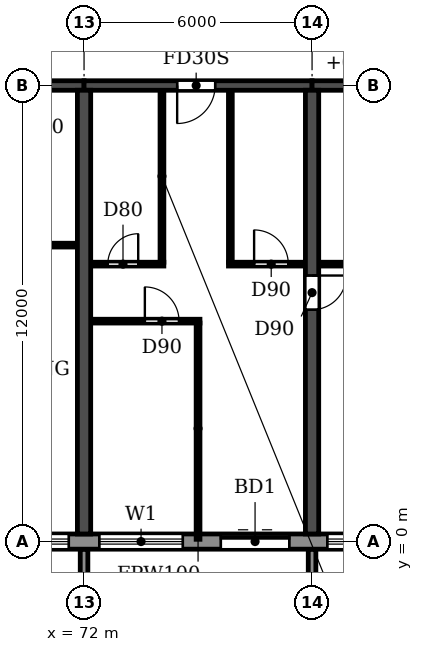
"""IFC4 building model, lengths in metres.
Left out: names, types, materials, properties, quantities, classifications, styles, units other than length and angle.
Written with IfcOpenShell. Run it as: python <this file> out.ifc"""

import sys

from ifc_helpers import new_model, si_unit, direction, frame, frame_2d, origin, place, context, subcontext, project, spatial, polyline, rectangle, outline, extrude, source, transform, mapped, element, fill, save


model = new_model("IFC4")
c1 = context("Model", 3, precision=1e-05, world=origin(), true_north=direction((0.0, 1.0)))
c2 = subcontext(c1, "Body", "Model", "MODEL_VIEW")
j1 = project(units=[si_unit("LENGTHUNIT", "METRE"), si_unit("PLANEANGLEUNIT", "RADIAN")], contexts=[c1])
p1 = place(None, origin())
s1 = spatial("IfcSite", under=j1, at=p1, CompositionType="ELEMENT")
p2 = place(p1, origin())
s2 = spatial("IfcBuilding", under=s1, at=p2, CompositionType="ELEMENT")
p3 = place(p2, frame((0.0, 0.0, 76.2)))
s3 = spatial("IfcBuildingStorey", under=s2, at=p3, CompositionType="ELEMENT", Elevation=76.2)
p4 = place(p3, frame((72.0, 0.2, 0.0), z_axis=(0.0, 0.0, 1.0), x_axis=(0.0, 1.0, 0.0)))
e1 = element("IfcWall", 1, at=p4, inside=s3, PredefinedType="SHEAR", context=c2, shape_type="SweptSolid", body=[
    extrude(rectangle(XDim=11.675, YDim=0.35, at=frame_2d((5.837, 0.0))), origin(), (0.0, 0.0, 1.0), 3.06),
])
p5 = place(p3, frame((78.0, 0.2, 0.0), z_axis=(0.0, 0.0, 1.0), x_axis=(0.0, 1.0, 0.0)))
e2 = element("IfcWall", 2, at=p5, inside=s3, PredefinedType="SHEAR", context=c2, shape_type="SweptSolid", body=[
    extrude(rectangle(XDim=11.675, YDim=0.35, at=frame_2d((5.837, 0.0))), origin(), (0.0, 0.0, 1.0), 3.06),
])
p6 = place(p5, frame((5.9, 0.0, 0.0)))
e3 = element("IfcOpeningElement", 3, at=p6, cuts=e2, PredefinedType="OPENING", context=c2, shape_type="SweptSolid", body=[
    extrude(rectangle(XDim=0.9, YDim=2.1, at=frame_2d((0.45, 1.05))), frame((0.0, 0.185, 0.0), z_axis=(0.0, -1.0, 0.0), x_axis=(1.0, 0.0, 0.0)), (0.0, 0.0, 1.0), 0.37),
])
p7 = place(p3, frame((66.0, 12.0, 0.0), z_axis=(0.0, 0.0, 1.0), x_axis=(1.0, 0.0, 0.0)))
e4 = element("IfcWall", 4, at=p7, inside=s3, PredefinedType="SHEAR", context=c2, shape_type="SweptSolid", body=[
    extrude(rectangle(XDim=6.0, YDim=0.25, at=frame_2d((3.0, 0.0))), origin(), (0.0, 0.0, 1.0), 2.46),
])
p8 = place(p7, frame((2.55, 0.0, 0.0)))
e5 = element("IfcOpeningElement", 5, at=p8, cuts=e4, PredefinedType="OPENING", context=c2, shape_type="SweptSolid", body=[
    extrude(rectangle(XDim=1.0, YDim=2.1, at=frame_2d((0.5, 1.05))), frame((0.0, 0.135, 0.0), z_axis=(0.0, -1.0, 0.0), x_axis=(1.0, 0.0, 0.0)), (0.0, 0.0, 1.0), 0.27),
])
p9 = place(p3, frame((72.0, 12.0, 0.0), z_axis=(0.0, 0.0, 1.0), x_axis=(1.0, 0.0, 0.0)))
e6 = element("IfcWall", 6, at=p9, inside=s3, PredefinedType="SHEAR", context=c2, shape_type="SweptSolid", body=[
    extrude(rectangle(XDim=6.0, YDim=0.25, at=frame_2d((3.0, 0.0))), origin(), (0.0, 0.0, 1.0), 2.46),
])
p10 = place(p9, frame((2.45, 0.0, 0.0)))
e7 = element("IfcOpeningElement", 7, at=p10, cuts=e6, PredefinedType="OPENING", context=c2, shape_type="SweptSolid", body=[
    extrude(rectangle(XDim=1.0, YDim=2.1, at=frame_2d((0.5, 1.05))), frame((0.0, 0.135, 0.0), z_axis=(0.0, -1.0, 0.0), x_axis=(1.0, 0.0, 0.0)), (0.0, 0.0, 1.0), 0.27),
])
p11 = place(p3, frame((78.0, 12.0, 0.0), z_axis=(0.0, 0.0, 1.0), x_axis=(1.0, 0.0, 0.0)))
e8 = element("IfcWall", 8, at=p11, inside=s3, PredefinedType="SHEAR", context=c2, shape_type="SweptSolid", body=[
    extrude(rectangle(XDim=6.0, YDim=0.25, at=frame_2d((3.0, 0.0))), origin(), (0.0, 0.0, 1.0), 2.46),
])
p12 = place(p3, frame((10.683, 0.0, 0.0), z_axis=(0.0, 0.0, 1.0), x_axis=(1.0, 0.0, 0.0)))
e9 = element("IfcWall", 9, at=p12, inside=s3, PredefinedType="STANDARD", context=c2, shape_type="SweptSolid", body=[
    extrude(rectangle(XDim=80.634, YDim=0.4, at=frame_2d((40.317, 0.0))), origin(), (0.0, 0.0, 1.0), 3.06),
])
p13 = place(p12, frame((1.717, 0.0, 0.9)))
e10 = element("IfcOpeningElement", 10, at=p13, cuts=e9, PredefinedType="OPENING", context=c2, shape_type="SweptSolid", body=[
    extrude(rectangle(XDim=2.2, YDim=1.5, at=frame_2d((1.1, 0.75))), frame((0.0, 0.21, 0.0), z_axis=(0.0, -1.0, 0.0), x_axis=(1.0, 0.0, 0.0)), (0.0, 0.0, 1.0), 0.42),
])
p14 = place(p12, frame((4.917, 0.0, 0.0)))
e11 = element("IfcOpeningElement", 11, at=p14, cuts=e9, PredefinedType="OPENING", context=c2, shape_type="SweptSolid", body=[
    extrude(rectangle(XDim=1.8, YDim=2.4, at=frame_2d((0.9, 1.2))), frame((0.0, 0.21, 0.0), z_axis=(0.0, -1.0, 0.0), x_axis=(1.0, 0.0, 0.0)), (0.0, 0.0, 1.0), 0.42),
])
p15 = place(p12, frame((7.717, 0.0, 0.9)))
e12 = element("IfcOpeningElement", 12, at=p15, cuts=e9, PredefinedType="OPENING", context=c2, shape_type="SweptSolid", body=[
    extrude(rectangle(XDim=2.2, YDim=1.5, at=frame_2d((1.1, 0.75))), frame((0.0, 0.21, 0.0), z_axis=(0.0, -1.0, 0.0), x_axis=(1.0, 0.0, 0.0)), (0.0, 0.0, 1.0), 0.42),
])
p16 = place(p12, frame((10.717, 0.0, 0.9)))
e13 = element("IfcOpeningElement", 13, at=p16, cuts=e9, PredefinedType="OPENING", context=c2, shape_type="SweptSolid", body=[
    extrude(rectangle(XDim=2.2, YDim=1.5, at=frame_2d((1.1, 0.75))), frame((0.0, 0.21, 0.0), z_axis=(0.0, -1.0, 0.0), x_axis=(1.0, 0.0, 0.0)), (0.0, 0.0, 1.0), 0.42),
])
p17 = place(p12, frame((13.717, 0.0, 0.9)))
e14 = element("IfcOpeningElement", 14, at=p17, cuts=e9, PredefinedType="OPENING", context=c2, shape_type="SweptSolid", body=[
    extrude(rectangle(XDim=2.2, YDim=1.5, at=frame_2d((1.1, 0.75))), frame((0.0, 0.21, 0.0), z_axis=(0.0, -1.0, 0.0), x_axis=(1.0, 0.0, 0.0)), (0.0, 0.0, 1.0), 0.42),
])
p18 = place(p12, frame((16.917, 0.0, 0.0)))
e15 = element("IfcOpeningElement", 15, at=p18, cuts=e9, PredefinedType="OPENING", context=c2, shape_type="SweptSolid", body=[
    extrude(rectangle(XDim=1.8, YDim=2.4, at=frame_2d((0.9, 1.2))), frame((0.0, 0.21, 0.0), z_axis=(0.0, -1.0, 0.0), x_axis=(1.0, 0.0, 0.0)), (0.0, 0.0, 1.0), 0.42),
])
p19 = place(p12, frame((19.717, 0.0, 0.9)))
e16 = element("IfcOpeningElement", 16, at=p19, cuts=e9, PredefinedType="OPENING", context=c2, shape_type="SweptSolid", body=[
    extrude(rectangle(XDim=2.2, YDim=1.5, at=frame_2d((1.1, 0.75))), frame((0.0, 0.21, 0.0), z_axis=(0.0, -1.0, 0.0), x_axis=(1.0, 0.0, 0.0)), (0.0, 0.0, 1.0), 0.42),
])
p20 = place(p12, frame((22.717, 0.0, 0.9)))
e17 = element("IfcOpeningElement", 17, at=p20, cuts=e9, PredefinedType="OPENING", context=c2, shape_type="SweptSolid", body=[
    extrude(rectangle(XDim=2.2, YDim=1.5, at=frame_2d((1.1, 0.75))), frame((0.0, 0.21, 0.0), z_axis=(0.0, -1.0, 0.0), x_axis=(1.0, 0.0, 0.0)), (0.0, 0.0, 1.0), 0.42),
])
p21 = place(p12, frame((25.917, 0.0, 0.0)))
e18 = element("IfcOpeningElement", 18, at=p21, cuts=e9, PredefinedType="OPENING", context=c2, shape_type="SweptSolid", body=[
    extrude(rectangle(XDim=1.8, YDim=2.4, at=frame_2d((0.9, 1.2))), frame((0.0, 0.21, 0.0), z_axis=(0.0, -1.0, 0.0), x_axis=(1.0, 0.0, 0.0)), (0.0, 0.0, 1.0), 0.42),
])
p22 = place(p12, frame((28.717, 0.0, 0.9)))
e19 = element("IfcOpeningElement", 19, at=p22, cuts=e9, PredefinedType="OPENING", context=c2, shape_type="SweptSolid", body=[
    extrude(rectangle(XDim=2.2, YDim=1.5, at=frame_2d((1.1, 0.75))), frame((0.0, 0.21, 0.0), z_axis=(0.0, -1.0, 0.0), x_axis=(1.0, 0.0, 0.0)), (0.0, 0.0, 1.0), 0.42),
])
p23 = place(p12, frame((31.717, 0.0, 0.9)))
e20 = element("IfcOpeningElement", 20, at=p23, cuts=e9, PredefinedType="OPENING", context=c2, shape_type="SweptSolid", body=[
    extrude(rectangle(XDim=2.2, YDim=1.5, at=frame_2d((1.1, 0.75))), frame((0.0, 0.21, 0.0), z_axis=(0.0, -1.0, 0.0), x_axis=(1.0, 0.0, 0.0)), (0.0, 0.0, 1.0), 0.42),
])
p24 = place(p12, frame((34.717, 0.0, 0.9)))
e21 = element("IfcOpeningElement", 21, at=p24, cuts=e9, PredefinedType="OPENING", context=c2, shape_type="SweptSolid", body=[
    extrude(rectangle(XDim=2.2, YDim=1.5, at=frame_2d((1.1, 0.75))), frame((0.0, 0.21, 0.0), z_axis=(0.0, -1.0, 0.0), x_axis=(1.0, 0.0, 0.0)), (0.0, 0.0, 1.0), 0.42),
])
p25 = place(p12, frame((37.917, 0.0, 0.0)))
e22 = element("IfcOpeningElement", 22, at=p25, cuts=e9, PredefinedType="OPENING", context=c2, shape_type="SweptSolid", body=[
    extrude(rectangle(XDim=1.8, YDim=2.4, at=frame_2d((0.9, 1.2))), frame((0.0, 0.21, 0.0), z_axis=(0.0, -1.0, 0.0), x_axis=(1.0, 0.0, 0.0)), (0.0, 0.0, 1.0), 0.42),
])
p26 = place(p12, frame((40.717, 0.0, 0.9)))
e23 = element("IfcOpeningElement", 23, at=p26, cuts=e9, PredefinedType="OPENING", context=c2, shape_type="SweptSolid", body=[
    extrude(rectangle(XDim=2.2, YDim=1.5, at=frame_2d((1.1, 0.75))), frame((0.0, 0.21, 0.0), z_axis=(0.0, -1.0, 0.0), x_axis=(1.0, 0.0, 0.0)), (0.0, 0.0, 1.0), 0.42),
])
p27 = place(p12, frame((43.717, 0.0, 0.9)))
e24 = element("IfcOpeningElement", 24, at=p27, cuts=e9, PredefinedType="OPENING", context=c2, shape_type="SweptSolid", body=[
    extrude(rectangle(XDim=2.2, YDim=1.5, at=frame_2d((1.1, 0.75))), frame((0.0, 0.21, 0.0), z_axis=(0.0, -1.0, 0.0), x_axis=(1.0, 0.0, 0.0)), (0.0, 0.0, 1.0), 0.42),
])
p28 = place(p12, frame((46.717, 0.0, 0.9)))
e25 = element("IfcOpeningElement", 25, at=p28, cuts=e9, PredefinedType="OPENING", context=c2, shape_type="SweptSolid", body=[
    extrude(rectangle(XDim=2.2, YDim=1.5, at=frame_2d((1.1, 0.75))), frame((0.0, 0.21, 0.0), z_axis=(0.0, -1.0, 0.0), x_axis=(1.0, 0.0, 0.0)), (0.0, 0.0, 1.0), 0.42),
])
p29 = place(p12, frame((49.917, 0.0, 0.0)))
e26 = element("IfcOpeningElement", 26, at=p29, cuts=e9, PredefinedType="OPENING", context=c2, shape_type="SweptSolid", body=[
    extrude(rectangle(XDim=1.8, YDim=2.4, at=frame_2d((0.9, 1.2))), frame((0.0, 0.21, 0.0), z_axis=(0.0, -1.0, 0.0), x_axis=(1.0, 0.0, 0.0)), (0.0, 0.0, 1.0), 0.42),
])
p30 = place(p12, frame((52.717, 0.0, 0.9)))
e27 = element("IfcOpeningElement", 27, at=p30, cuts=e9, PredefinedType="OPENING", context=c2, shape_type="SweptSolid", body=[
    extrude(rectangle(XDim=2.2, YDim=1.5, at=frame_2d((1.1, 0.75))), frame((0.0, 0.21, 0.0), z_axis=(0.0, -1.0, 0.0), x_axis=(1.0, 0.0, 0.0)), (0.0, 0.0, 1.0), 0.42),
])
p31 = place(p12, frame((55.717, 0.0, 0.9)))
e28 = element("IfcOpeningElement", 28, at=p31, cuts=e9, PredefinedType="OPENING", context=c2, shape_type="SweptSolid", body=[
    extrude(rectangle(XDim=2.2, YDim=1.5, at=frame_2d((1.1, 0.75))), frame((0.0, 0.21, 0.0), z_axis=(0.0, -1.0, 0.0), x_axis=(1.0, 0.0, 0.0)), (0.0, 0.0, 1.0), 0.42),
])
p32 = place(p12, frame((58.717, 0.0, 0.9)))
e29 = element("IfcOpeningElement", 29, at=p32, cuts=e9, PredefinedType="OPENING", context=c2, shape_type="SweptSolid", body=[
    extrude(rectangle(XDim=2.2, YDim=1.5, at=frame_2d((1.1, 0.75))), frame((0.0, 0.21, 0.0), z_axis=(0.0, -1.0, 0.0), x_axis=(1.0, 0.0, 0.0)), (0.0, 0.0, 1.0), 0.42),
])
p33 = place(p12, frame((61.717, 0.0, 0.9)))
e30 = element("IfcOpeningElement", 30, at=p33, cuts=e9, PredefinedType="OPENING", context=c2, shape_type="SweptSolid", body=[
    extrude(rectangle(XDim=2.2, YDim=1.5, at=frame_2d((1.1, 0.75))), frame((0.0, 0.21, 0.0), z_axis=(0.0, -1.0, 0.0), x_axis=(1.0, 0.0, 0.0)), (0.0, 0.0, 1.0), 0.42),
])
p34 = place(p12, frame((64.917, 0.0, 0.0)))
e31 = element("IfcOpeningElement", 31, at=p34, cuts=e9, PredefinedType="OPENING", context=c2, shape_type="SweptSolid", body=[
    extrude(rectangle(XDim=1.8, YDim=2.4, at=frame_2d((0.9, 1.2))), frame((0.0, 0.21, 0.0), z_axis=(0.0, -1.0, 0.0), x_axis=(1.0, 0.0, 0.0)), (0.0, 0.0, 1.0), 0.42),
])
p35 = place(p12, frame((67.717, 0.0, 0.9)))
e32 = element("IfcOpeningElement", 32, at=p35, cuts=e9, PredefinedType="OPENING", context=c2, shape_type="SweptSolid", body=[
    extrude(rectangle(XDim=2.2, YDim=1.5, at=frame_2d((1.1, 0.75))), frame((0.0, 0.21, 0.0), z_axis=(0.0, -1.0, 0.0), x_axis=(1.0, 0.0, 0.0)), (0.0, 0.0, 1.0), 0.42),
])
p36 = place(p12, frame((70.717, 0.0, 0.9)))
e33 = element("IfcOpeningElement", 33, at=p36, cuts=e9, PredefinedType="OPENING", context=c2, shape_type="SweptSolid", body=[
    extrude(rectangle(XDim=2.2, YDim=1.5, at=frame_2d((1.1, 0.75))), frame((0.0, 0.21, 0.0), z_axis=(0.0, -1.0, 0.0), x_axis=(1.0, 0.0, 0.0)), (0.0, 0.0, 1.0), 0.42),
])
p37 = place(p12, frame((73.917, 0.0, 0.0)))
e34 = element("IfcOpeningElement", 34, at=p37, cuts=e9, PredefinedType="OPENING", context=c2, shape_type="SweptSolid", body=[
    extrude(rectangle(XDim=1.8, YDim=2.4, at=frame_2d((0.9, 1.2))), frame((0.0, 0.21, 0.0), z_axis=(0.0, -1.0, 0.0), x_axis=(1.0, 0.0, 0.0)), (0.0, 0.0, 1.0), 0.42),
])
p38 = place(p12, frame((76.717, 0.0, 0.9)))
e35 = element("IfcOpeningElement", 35, at=p38, cuts=e9, PredefinedType="OPENING", context=c2, shape_type="SweptSolid", body=[
    extrude(rectangle(XDim=2.2, YDim=1.5, at=frame_2d((1.1, 0.75))), frame((0.0, 0.21, 0.0), z_axis=(0.0, -1.0, 0.0), x_axis=(1.0, 0.0, 0.0)), (0.0, 0.0, 1.0), 0.42),
])
m1 = source(origin(), c2, "Body", "SweptSolid", [
    extrude(outline(polyline([(0.0, 0.0), (0.2, 0.0), (0.2, 1.65), (0.0, 1.65), (0.0, 0.0)])), origin(), (0.0, 0.0, 1.0), 3.1),
])
for number, where in (
    (36, (71.9, -1.85, 0.0)),
    (37, (77.9, -1.85, 0.0)),
):
    element("IfcWall", number, at=place(p3, frame(where)), inside=s3, PredefinedType="STANDARD", context=c2, shape_type="MappedRepresentation", body=[
        mapped(m1, transform((0.0, 0.0, 0.0))),
    ])
p39 = place(p3, frame((72.185, 5.8, 0.0), z_axis=(0.0, 0.0, 1.0), x_axis=(1.0, 0.0, 0.0)))
e38 = element("IfcWall", 38, at=p39, inside=s3, PredefinedType="PARTITIONING", context=c2, shape_type="SweptSolid", body=[
    extrude(rectangle(XDim=2.865, YDim=0.1, at=frame_2d((1.433, 0.0))), origin(), (0.0, 0.0, 1.0), 3.06),
])
p40 = place(p39, frame((1.415, 0.0, 0.0)))
e39 = element("IfcOpeningElement", 39, at=p40, cuts=e38, PredefinedType="OPENING", context=c2, shape_type="SweptSolid", body=[
    extrude(rectangle(XDim=0.9, YDim=2.1, at=frame_2d((0.45, 1.05))), frame((0.0, 0.06, 0.0), z_axis=(0.0, -1.0, 0.0), x_axis=(1.0, 0.0, 0.0)), (0.0, 0.0, 1.0), 0.12),
])
p41 = place(p3, frame((72.185, 7.3, 0.0), z_axis=(0.0, 0.0, 1.0), x_axis=(1.0, 0.0, 0.0)))
e40 = element("IfcWall", 40, at=p41, inside=s3, PredefinedType="PARTITIONING", context=c2, shape_type="SweptSolid", body=[
    extrude(rectangle(XDim=1.915, YDim=0.1, at=frame_2d((0.958, 0.0))), origin(), (0.0, 0.0, 1.0), 3.06),
])
p42 = place(p41, frame((0.44, 0.0, 0.0)))
e41 = element("IfcOpeningElement", 41, at=p42, cuts=e40, PredefinedType="OPENING", context=c2, shape_type="SweptSolid", body=[
    extrude(rectangle(XDim=0.8, YDim=2.1, at=frame_2d((0.4, 1.05))), frame((0.0, 0.06, 0.0), z_axis=(0.0, -1.0, 0.0), x_axis=(1.0, 0.0, 0.0)), (0.0, 0.0, 1.0), 0.12),
])
p43 = place(p3, frame((75.8, 7.3, 0.0), z_axis=(0.0, 0.0, 1.0), x_axis=(1.0, 0.0, 0.0)))
e42 = element("IfcWall", 42, at=p43, inside=s3, PredefinedType="PARTITIONING", context=c2, shape_type="SweptSolid", body=[
    extrude(rectangle(XDim=2.015, YDim=0.1, at=frame_2d((1.007, 0.0))), origin(), (0.0, 0.0, 1.0), 3.06),
])
p44 = place(p43, frame((0.675, 0.0, 0.0)))
e43 = element("IfcOpeningElement", 43, at=p44, cuts=e42, PredefinedType="OPENING", context=c2, shape_type="SweptSolid", body=[
    extrude(rectangle(XDim=0.9, YDim=2.1, at=frame_2d((0.45, 1.05))), frame((0.0, 0.06, 0.0), z_axis=(0.0, -1.0, 0.0), x_axis=(1.0, 0.0, 0.0)), (0.0, 0.0, 1.0), 0.12),
])
p45 = place(p3, frame((78.185, 7.3, 0.0), z_axis=(0.0, 0.0, 1.0), x_axis=(1.0, 0.0, 0.0)))
e44 = element("IfcWall", 44, at=p45, inside=s3, PredefinedType="PARTITIONING", context=c2, shape_type="SweptSolid", body=[
    extrude(rectangle(XDim=2.715, YDim=0.1, at=frame_2d((1.357, 0.0))), origin(), (0.0, 0.0, 1.0), 3.06),
])
p46 = place(p45, frame((0.915, 0.0, 0.0)))
e45 = element("IfcOpeningElement", 45, at=p46, cuts=e44, PredefinedType="OPENING", context=c2, shape_type="SweptSolid", body=[
    extrude(rectangle(XDim=0.8, YDim=2.1, at=frame_2d((0.4, 1.05))), frame((0.0, 0.06, 0.0), z_axis=(0.0, -1.0, 0.0), x_axis=(1.0, 0.0, 0.0)), (0.0, 0.0, 1.0), 0.12),
])
p47 = place(p3, frame((69.9, 7.8, 0.0), z_axis=(0.0, 0.0, 1.0), x_axis=(1.0, 0.0, 0.0)))
e46 = element("IfcWall", 46, at=p47, inside=s3, PredefinedType="PARTITIONING", context=c2, shape_type="SweptSolid", body=[
    extrude(rectangle(XDim=1.915, YDim=0.1, at=frame_2d((0.958, 0.0))), origin(), (0.0, 0.0, 1.0), 3.06),
])
p48 = place(p3, frame((74.05, 7.35, 0.0), z_axis=(0.0, 0.0, 1.0), x_axis=(0.0, 1.0, 0.0)))
e47 = element("IfcWall", 47, at=p48, inside=s3, PredefinedType="PARTITIONING", context=c2, shape_type="SweptSolid", body=[
    extrude(rectangle(XDim=4.515, YDim=0.1, at=frame_2d((2.257, 0.0))), origin(), (0.0, 0.0, 1.0), 3.06),
])
p49 = place(p3, frame((75.0, 0.06, 0.0), z_axis=(0.0, 0.0, 1.0), x_axis=(0.0, 1.0, 0.0)))
e48 = element("IfcWall", 48, at=p49, inside=s3, PredefinedType="PARTITIONING", context=c2, shape_type="SweptSolid", body=[
    extrude(rectangle(XDim=5.69, YDim=0.1, at=frame_2d((2.845, 0.0))), origin(), (0.0, 0.0, 1.0), 3.06),
])
p50 = place(p3, frame((75.85, 7.35, 0.0), z_axis=(0.0, 0.0, 1.0), x_axis=(0.0, 1.0, 0.0)))
e49 = element("IfcWall", 49, at=p50, inside=s3, PredefinedType="PARTITIONING", context=c2, shape_type="SweptSolid", body=[
    extrude(rectangle(XDim=4.515, YDim=0.1, at=frame_2d((2.257, 0.0))), origin(), (0.0, 0.0, 1.0), 3.06),
])
p51 = place(p32, origin())
e50 = element("IfcWindow", 50, at=p51, inside=s3, PartitioningType="DOUBLE_PANEL_HORIZONTAL", PredefinedType="WINDOW", context=c2, shape_type="SweptSolid", body=[
    extrude(rectangle(XDim=2.2, YDim=1.5, at=frame_2d((1.1, 0.75))), frame((0.0, 0.03, 0.0), z_axis=(0.0, -1.0, 0.0), x_axis=(1.0, 0.0, 0.0)), (0.0, 0.0, 1.0), 0.06),
])
fill(e29, e50)
p52 = place(p33, origin())
e51 = element("IfcWindow", 51, at=p52, inside=s3, PartitioningType="DOUBLE_PANEL_HORIZONTAL", PredefinedType="WINDOW", context=c2, shape_type="SweptSolid", body=[
    extrude(rectangle(XDim=2.2, YDim=1.5, at=frame_2d((1.1, 0.75))), frame((0.0, 0.03, 0.0), z_axis=(0.0, -1.0, 0.0), x_axis=(1.0, 0.0, 0.0)), (0.0, 0.0, 1.0), 0.06),
])
fill(e30, e51)
p53 = place(p34, origin())
e52 = element("IfcDoor", 52, at=p53, inside=s3, OperationType="DOUBLE_DOOR_SLIDING", PredefinedType="DOOR", context=c2, shape_type="SweptSolid", body=[
    extrude(rectangle(XDim=1.8, YDim=2.4, at=frame_2d((0.9, 1.2))), frame((0.0, 0.025, 0.0), z_axis=(0.0, -1.0, 0.0), x_axis=(1.0, 0.0, 0.0)), (0.0, 0.0, 1.0), 0.05),
])
fill(e31, e52)
p54 = place(p35, origin())
e53 = element("IfcWindow", 53, at=p54, inside=s3, PartitioningType="DOUBLE_PANEL_HORIZONTAL", PredefinedType="WINDOW", context=c2, shape_type="SweptSolid", body=[
    extrude(rectangle(XDim=2.2, YDim=1.5, at=frame_2d((1.1, 0.75))), frame((0.0, 0.03, 0.0), z_axis=(0.0, -1.0, 0.0), x_axis=(1.0, 0.0, 0.0)), (0.0, 0.0, 1.0), 0.06),
])
fill(e32, e53)
p55 = place(p42, origin())
e54 = element("IfcDoor", 54, at=p55, inside=s3, OperationType="SINGLE_SWING_RIGHT", PredefinedType="DOOR", context=c2, shape_type="SweptSolid", body=[
    extrude(rectangle(XDim=0.8, YDim=2.1, at=frame_2d((0.4, 1.05))), frame((0.0, 0.025, 0.0), z_axis=(0.0, -1.0, 0.0), x_axis=(1.0, 0.0, 0.0)), (0.0, 0.0, 1.0), 0.05),
])
fill(e41, e54)
p56 = place(p40, origin())
e55 = element("IfcDoor", 55, at=p56, inside=s3, OperationType="SINGLE_SWING_LEFT", PredefinedType="DOOR", context=c2, shape_type="SweptSolid", body=[
    extrude(rectangle(XDim=0.9, YDim=2.1, at=frame_2d((0.45, 1.05))), frame((0.0, 0.025, 0.0), z_axis=(0.0, -1.0, 0.0), x_axis=(1.0, 0.0, 0.0)), (0.0, 0.0, 1.0), 0.05),
])
fill(e39, e55)
p57 = place(p10, frame((1.0, 0.0, 0.0), z_axis=(0.0, 0.0, 1.0), x_axis=(-1.0, 0.0, 0.0)))
e56 = element("IfcDoor", 56, at=p57, inside=s3, OperationType="SINGLE_SWING_RIGHT", PredefinedType="DOOR", context=c2, shape_type="SweptSolid", body=[
    extrude(rectangle(XDim=1.0, YDim=2.1, at=frame_2d((0.5, 1.05))), frame((0.0, 0.025, 0.0), z_axis=(0.0, -1.0, 0.0), x_axis=(1.0, 0.0, 0.0)), (0.0, 0.0, 1.0), 0.05),
])
fill(e7, e56)
p58 = place(p44, origin())
e57 = element("IfcDoor", 57, at=p58, inside=s3, OperationType="SINGLE_SWING_LEFT", PredefinedType="DOOR", context=c2, shape_type="SweptSolid", body=[
    extrude(rectangle(XDim=0.9, YDim=2.1, at=frame_2d((0.45, 1.05))), frame((0.0, 0.025, 0.0), z_axis=(0.0, -1.0, 0.0), x_axis=(1.0, 0.0, 0.0)), (0.0, 0.0, 1.0), 0.05),
])
fill(e43, e57)
p59 = place(p6, frame((0.9, 0.0, 0.0), z_axis=(0.0, 0.0, 1.0), x_axis=(-1.0, 0.0, 0.0)))
e58 = element("IfcDoor", 58, at=p59, inside=s3, OperationType="SINGLE_SWING_LEFT", PredefinedType="DOOR", context=c2, shape_type="SweptSolid", body=[
    extrude(rectangle(XDim=0.9, YDim=2.1, at=frame_2d((0.45, 1.05))), frame((0.0, 0.025, 0.0), z_axis=(0.0, -1.0, 0.0), x_axis=(1.0, 0.0, 0.0)), (0.0, 0.0, 1.0), 0.05),
])
fill(e3, e58)
save(model, sys.argv[1])
